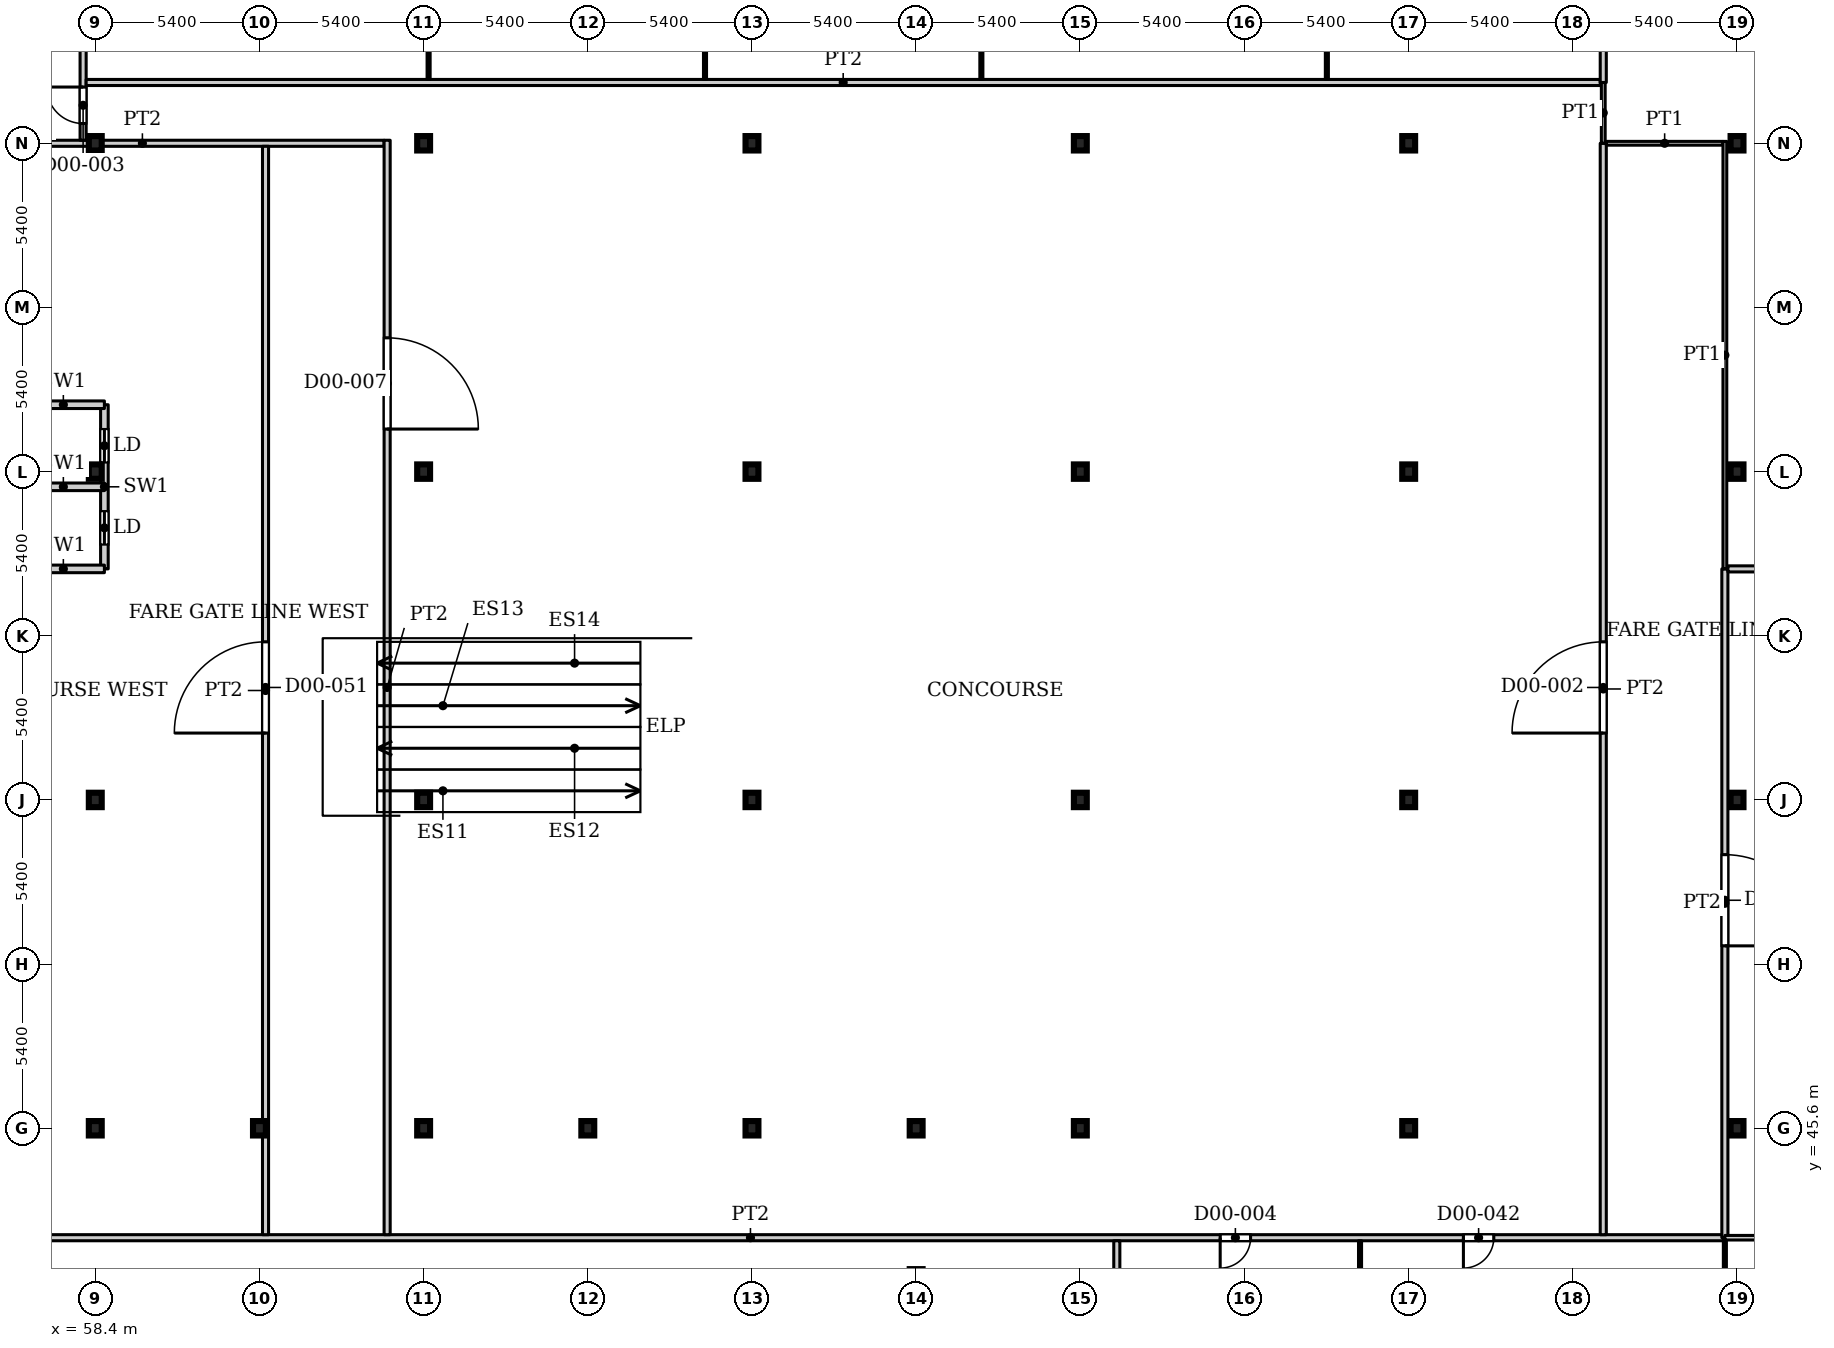
"""IFC4 building model, lengths in metres.
Left out: names, types, materials, properties, quantities, classifications, styles, units other than length and angle.
Written with IfcOpenShell. Run it as: python <this file> out.ifc"""

import sys

from ifc_helpers import new_model, si_unit, direction, frame, frame_2d, origin, origin_2d, place, context, subcontext, project, spatial, rectangle, i_section, extrude, source, transform, mapped, element, fill, save


model = new_model("IFC4")
c1 = context("Model", 3, precision=1e-05, world=origin(), true_north=direction((0.0, 1.0)))
c2 = subcontext(c1, "Body", "Model", "MODEL_VIEW")
j1 = project(units=[si_unit("LENGTHUNIT", "METRE"), si_unit("PLANEANGLEUNIT", "RADIAN")], contexts=[c1])
p1 = place(None, origin())
s1 = spatial("IfcSite", under=j1, at=p1, CompositionType="ELEMENT")
p2 = place(p1, origin())
s2 = spatial("IfcBuilding", under=s1, at=p2, CompositionType="ELEMENT")
p3 = place(p2, origin())
s3 = spatial("IfcBuildingStorey", under=s2, at=p3, CompositionType="ELEMENT", Elevation=0.0)
for number, where, z_axis, x_axis in (
    (1, (58.4, 45.6, 0.0), (0.0, 0.0, 1.0), (1.0, 0.0, 0.0)),
    (2, (69.2, 45.6, 0.0), (0.0, 0.0, 1.0), (1.0, 0.0, 0.0)),
    (3, (80.0, 45.6, 0.0), (0.0, 0.0, 1.0), (1.0, 0.0, 0.0)),
    (4, (90.8, 45.6, 0.0), (0.0, 0.0, 1.0), (1.0, 0.0, 0.0)),
    (5, (101.6, 45.6, 0.0), (0.0, 0.0, 1.0), (1.0, 0.0, 0.0)),
    (6, (112.4, 45.6, 0.0), (0.0, 0.0, 1.0), (1.0, 0.0, 0.0)),
    (7, (58.4, 56.4, 0.0), (0.0, 0.0, 1.0), (1.0, 0.0, 0.0)),
    (8, (69.2, 56.4, 0.0), (0.0, 0.0, 1.0), (1.0, 0.0, 0.0)),
    (9, (80.0, 56.4, 0.0), (0.0, 0.0, 1.0), (1.0, 0.0, 0.0)),
    (10, (90.8, 56.4, 0.0), (0.0, 0.0, 1.0), (1.0, 0.0, 0.0)),
    (11, (101.6, 56.4, 0.0), (0.0, 0.0, 1.0), (1.0, 0.0, 0.0)),
    (12, (112.4, 56.4, 0.0), (0.0, 0.0, 1.0), (1.0, 0.0, 0.0)),
    (13, (58.4, 67.2, 0.0), (0.0, 0.0, 1.0), (1.0, 0.0, 0.0)),
    (14, (69.2, 67.2, 0.0), (0.0, 0.0, 1.0), (1.0, 0.0, 0.0)),
    (15, (80.0, 67.2, 0.0), (0.0, 0.0, 1.0), (1.0, 0.0, 0.0)),
    (16, (90.8, 67.2, 0.0), (0.0, 0.0, 1.0), (1.0, 0.0, 0.0)),
    (17, (101.6, 67.2, 0.0), (0.0, 0.0, 1.0), (1.0, 0.0, 0.0)),
    (18, (112.4, 67.2, 0.0), (0.0, 0.0, 1.0), (1.0, 0.0, 0.0)),
    (19, (58.4, 78.0, 0.0), (0.0, 0.0, 1.0), (1.0, 0.0, 0.0)),
    (20, (69.2, 78.0, 0.0), (0.0, 0.0, 1.0), (1.0, 0.0, 0.0)),
    (21, (80.0, 78.0, 0.0), (0.0, 0.0, 1.0), (1.0, 0.0, 0.0)),
    (22, (90.8, 78.0, 0.0), (0.0, 0.0, 1.0), (1.0, 0.0, 0.0)),
    (23, (101.6, 78.0, 0.0), (0.0, 0.0, 1.0), (1.0, 0.0, 0.0)),
    (24, (112.4, 78.0, 0.0), (0.0, 0.0, 1.0), (1.0, 0.0, 0.0)),
    (25, (63.8, 45.6, 0.0), (0.0, 0.0, 1.0), (1.0, 0.0, 0.0)),
    (26, (74.6, 45.6, 0.0), (0.0, 0.0, 1.0), (1.0, 0.0, 0.0)),
    (27, (85.4, 45.6, 0.0), (0.0, 0.0, 1.0), (1.0, 0.0, 0.0)),
):
    element("IfcColumn", number, at=place(p3, frame(where, z_axis=z_axis, x_axis=x_axis)), inside=s3, PredefinedType="COLUMN", context=c2, shape_type="SweptSolid", body=[
        extrude(i_section(OverallWidth=0.424, OverallDepth=0.474, WebThickness=0.048, FlangeThickness=0.077, FilletRadius=0.014, at=origin_2d()), origin(), (0.0, 0.0, 1.0), 7.5),
    ])
p4 = place(p3, frame((58.7, 64.0, 0.0), z_axis=(0.0, 0.0, 1.0), x_axis=(0.0, 1.0, 0.0)))
e28 = element("IfcWall", 28, at=p4, inside=s3, PredefinedType="PARTITIONING", context=c2, shape_type="SweptSolid", body=[
    extrude(rectangle(XDim=5.4, YDim=0.25, at=frame_2d((2.7, 0.0))), origin(), (0.0, 0.0, 1.0), 7.5),
])
p5 = place(p4, frame((0.8, 0.0, 0.0)))
e29 = element("IfcOpeningElement", 29, at=p5, cuts=e28, PredefinedType="OPENING", context=c2, shape_type="SweptSolid", body=[
    extrude(rectangle(XDim=1.1, YDim=2.2, at=frame_2d((0.55, 1.1))), frame((0.0, 0.135, 0.0), z_axis=(0.0, -1.0, 0.0), x_axis=(1.0, 0.0, 0.0)), (0.0, 0.0, 1.0), 0.27),
])
p6 = place(p4, frame((3.5, 0.0, 0.0)))
e30 = element("IfcOpeningElement", 30, at=p6, cuts=e28, PredefinedType="OPENING", context=c2, shape_type="SweptSolid", body=[
    extrude(rectangle(XDim=1.1, YDim=2.2, at=frame_2d((0.55, 1.1))), frame((0.0, 0.135, 0.0), z_axis=(0.0, -1.0, 0.0), x_axis=(1.0, 0.0, 0.0)), (0.0, 0.0, 1.0), 0.27),
])
for number, where, z_axis, x_axis in (
    (31, (56.0, 64.0, 0.0), (0.0, 0.0, 1.0), (1.0, 0.0, 0.0)),
    (32, (56.0, 66.7, 0.0), (0.0, 0.0, 1.0), (1.0, 0.0, 0.0)),
    (33, (56.0, 69.4, 0.0), (0.0, 0.0, 1.0), (1.0, 0.0, 0.0)),
):
    element("IfcWall", number, at=place(p3, frame(where, z_axis=z_axis, x_axis=x_axis)), inside=s3, PredefinedType="PARTITIONING", context=c2, shape_type="SweptSolid", body=[
        extrude(rectangle(XDim=2.7, YDim=0.25, at=frame_2d((1.35, 0.0))), origin(), (0.0, 0.0, 1.0), 7.5),
    ])
p7 = place(p3, frame((47.9, 42.0, 0.0), z_axis=(0.0, 0.0, 1.0), x_axis=(1.0, 0.0, 0.0)))
e34 = element("IfcWall", 34, at=p7, inside=s3, PredefinedType="PARTITIONING", context=c2, shape_type="SweptSolid", body=[
    extrude(rectangle(XDim=64.1, YDim=0.2, at=frame_2d((32.05, 0.0))), origin(), (0.0, 0.0, 1.0), 7.08),
])
p8 = place(p7, frame((47.5, 0.0, 0.0)))
e35 = element("IfcOpeningElement", 35, at=p8, cuts=e34, PredefinedType="OPENING", context=c2, shape_type="SweptSolid", body=[
    extrude(rectangle(XDim=1.0, YDim=2.1, at=frame_2d((0.5, 1.05))), frame((0.0, 0.11, 0.0), z_axis=(0.0, -1.0, 0.0), x_axis=(1.0, 0.0, 0.0)), (0.0, 0.0, 1.0), 0.22),
])
p9 = place(p7, frame((55.5, 0.0, 0.0)))
e36 = element("IfcOpeningElement", 36, at=p9, cuts=e34, PredefinedType="OPENING", context=c2, shape_type="SweptSolid", body=[
    extrude(rectangle(XDim=1.0, YDim=2.1, at=frame_2d((0.5, 1.05))), frame((0.0, 0.11, 0.0), z_axis=(0.0, -1.0, 0.0), x_axis=(1.0, 0.0, 0.0)), (0.0, 0.0, 1.0), 0.22),
])
p10 = place(p3, frame((52.0, 78.0, 0.0), z_axis=(0.0, 0.0, 1.0), x_axis=(1.0, 0.0, 0.0)))
e37 = element("IfcWall", 37, at=p10, inside=s3, PredefinedType="PARTITIONING", context=c2, shape_type="SweptSolid", body=[
    extrude(rectangle(XDim=15.9, YDim=0.2, at=frame_2d((7.95, 0.0))), origin(), (0.0, 0.0, 1.0), 7.08),
])
p11 = place(p10, frame((1.9, 0.0, 0.0)))
e38 = element("IfcOpeningElement", 38, at=p11, cuts=e37, PredefinedType="OPENING", context=c2, shape_type="SweptSolid", body=[
    extrude(rectangle(XDim=2.4, YDim=2.1, at=frame_2d((1.2, 1.05))), frame((0.0, 0.11, 0.0), z_axis=(0.0, -1.0, 0.0), x_axis=(1.0, 0.0, 0.0)), (0.0, 0.0, 1.0), 0.22),
])
p12 = place(p3, frame((58.0, 78.1, 0.0), z_axis=(0.0, 0.0, 1.0), x_axis=(0.0, 1.0, 0.0)))
e39 = element("IfcWall", 39, at=p12, inside=s3, PredefinedType="PARTITIONING", context=c2, shape_type="SweptSolid", body=[
    extrude(rectangle(XDim=31.9, YDim=0.2, at=frame_2d((15.95, 0.0))), origin(), (0.0, 0.0, 1.0), 7.08),
])
p13 = place(p12, frame((0.55, 0.0, 0.0)))
e40 = element("IfcOpeningElement", 40, at=p13, cuts=e39, PredefinedType="OPENING", context=c2, shape_type="SweptSolid", body=[
    extrude(rectangle(XDim=1.2, YDim=2.1, at=frame_2d((0.6, 1.05))), frame((0.0, 0.11, 0.0), z_axis=(0.0, -1.0, 0.0), x_axis=(1.0, 0.0, 0.0)), (0.0, 0.0, 1.0), 0.22),
])
p14 = place(p3, frame((58.1, 80.0, 0.0), z_axis=(0.0, 0.0, 1.0), x_axis=(1.0, 0.0, 0.0)))
e41 = element("IfcWall", 41, at=p14, inside=s3, PredefinedType="PARTITIONING", context=c2, shape_type="SweptSolid", body=[
    extrude(rectangle(XDim=49.8, YDim=0.2, at=frame_2d((24.9, 0.0))), origin(), (0.0, 0.0, 1.0), 7.08),
])
p15 = place(p3, frame((64.0, 42.1, 0.0), z_axis=(0.0, 0.0, 1.0), x_axis=(0.0, 1.0, 0.0)))
e42 = element("IfcWall", 42, at=p15, inside=s3, PredefinedType="PARTITIONING", context=c2, shape_type="SweptSolid", body=[
    extrude(rectangle(XDim=35.8, YDim=0.2, at=frame_2d((17.9, 0.0))), origin(), (0.0, 0.0, 1.0), 7.08),
])
p16 = place(p15, frame((16.5, 0.0, 0.0)))
e43 = element("IfcOpeningElement", 43, at=p16, cuts=e42, PredefinedType="OPENING", context=c2, shape_type="SweptSolid", body=[
    extrude(rectangle(XDim=3.0, YDim=2.1, at=frame_2d((1.5, 1.05))), frame((0.0, 0.11, 0.0), z_axis=(0.0, -1.0, 0.0), x_axis=(1.0, 0.0, 0.0)), (0.0, 0.0, 1.0), 0.22),
])
p17 = place(p3, frame((68.0, 42.1, 0.0), z_axis=(0.0, 0.0, 1.0), x_axis=(0.0, 1.0, 0.0)))
e44 = element("IfcWall", 44, at=p17, inside=s3, PredefinedType="PARTITIONING", context=c2, shape_type="SweptSolid", body=[
    extrude(rectangle(XDim=36.0, YDim=0.2, at=frame_2d((18.0, 0.0))), origin(), (0.0, 0.0, 1.0), 7.08),
])
p18 = place(p17, frame((26.5, 0.0, 0.0)))
e45 = element("IfcOpeningElement", 45, at=p18, cuts=e44, PredefinedType="OPENING", context=c2, shape_type="SweptSolid", body=[
    extrude(rectangle(XDim=3.0, YDim=2.1, at=frame_2d((1.5, 1.05))), frame((0.0, 0.11, 0.0), z_axis=(0.0, -1.0, 0.0), x_axis=(1.0, 0.0, 0.0)), (0.0, 0.0, 1.0), 0.22),
])
for number, where, z_axis, x_axis in (
    (46, (69.364, 80.1, 0.0), (0.0, 0.0, 1.0), (0.0, 1.0, 0.0)),
    (47, (78.455, 80.1, 0.0), (0.0, 0.0, 1.0), (0.0, 1.0, 0.0)),
    (48, (87.545, 80.1, 0.0), (0.0, 0.0, 1.0), (0.0, 1.0, 0.0)),
):
    element("IfcWall", number, at=place(p3, frame(where, z_axis=z_axis, x_axis=x_axis)), inside=s3, PredefinedType="PARTITIONING", context=c2, shape_type="SweptSolid", body=[
        extrude(rectangle(XDim=8.2, YDim=0.1, at=frame_2d((4.1, 0.0))), origin(), (0.0, 0.0, 1.0), 7.08),
    ])
p19 = place(p3, frame((92.0, 30.0, 0.0), z_axis=(0.0, 0.0, 1.0), x_axis=(0.0, 1.0, 0.0)))
e49 = element("IfcWall", 49, at=p19, inside=s3, PredefinedType="PARTITIONING", context=c2, shape_type="SweptSolid", body=[
    extrude(rectangle(XDim=11.9, YDim=0.2, at=frame_2d((5.95, 0.0))), origin(), (0.0, 0.0, 1.0), 7.08),
])
p20 = place(p3, frame((98.909, 80.1, 0.0), z_axis=(0.0, 0.0, 1.0), x_axis=(0.0, 1.0, 0.0)))
e50 = element("IfcWall", 50, at=p20, inside=s3, PredefinedType="PARTITIONING", context=c2, shape_type="SweptSolid", body=[
    extrude(rectangle(XDim=8.2, YDim=0.1, at=frame_2d((4.1, 0.0))), origin(), (0.0, 0.0, 1.0), 7.08),
])
p21 = place(p3, frame((100.0, 30.125, 0.0), z_axis=(0.0, 0.0, 1.0), x_axis=(0.0, 1.0, 0.0)))
e51 = element("IfcWall", 51, at=p21, inside=s3, PredefinedType="PARTITIONING", context=c2, shape_type="SweptSolid", body=[
    extrude(rectangle(XDim=11.775, YDim=0.1, at=frame_2d((5.887, 0.0))), origin(), (0.0, 0.0, 1.0), 7.08),
])
p22 = place(p3, frame((108.0, 42.1, 0.0), z_axis=(0.0, 0.0, 1.0), x_axis=(0.0, 1.0, 0.0)))
e52 = element("IfcWall", 52, at=p22, inside=s3, PredefinedType="PARTITIONING", context=c2, shape_type="SweptSolid", body=[
    extrude(rectangle(XDim=35.9, YDim=0.2, at=frame_2d((17.95, 0.0))), origin(), (0.0, 0.0, 1.0), 7.08),
])
p23 = place(p22, frame((16.5, 0.0, 0.0)))
e53 = element("IfcOpeningElement", 53, at=p23, cuts=e52, PredefinedType="OPENING", context=c2, shape_type="SweptSolid", body=[
    extrude(rectangle(XDim=3.0, YDim=2.1, at=frame_2d((1.5, 1.05))), frame((0.0, 0.11, 0.0), z_axis=(0.0, -1.0, 0.0), x_axis=(1.0, 0.0, 0.0)), (0.0, 0.0, 1.0), 0.22),
])
p24 = place(p3, frame((108.0, 78.0, 0.0), z_axis=(0.0, 0.0, 1.0), x_axis=(0.0, 1.0, 0.0)))
e54 = element("IfcWall", 54, at=p24, inside=s3, PredefinedType="PARTITIONING", context=c2, shape_type="SweptSolid", body=[
    extrude(rectangle(XDim=2.0, YDim=0.125, at=frame_2d((1.0, 0.0))), origin(), (0.0, 0.0, 1.0), 7.08),
])
p25 = place(p3, frame((108.0, 80.0, 0.0), z_axis=(0.0, 0.0, 1.0), x_axis=(0.0, 1.0, 0.0)))
e55 = element("IfcWall", 55, at=p25, inside=s3, PredefinedType="PARTITIONING", context=c2, shape_type="SweptSolid", body=[
    extrude(rectangle(XDim=8.4, YDim=0.2, at=frame_2d((4.2, 0.0))), origin(), (0.0, 0.0, 1.0), 7.08),
])
p26 = place(p3, frame((108.1, 78.0, 0.0), z_axis=(0.0, 0.0, 1.0), x_axis=(1.0, 0.0, 0.0)))
e56 = element("IfcWall", 56, at=p26, inside=s3, PredefinedType="PARTITIONING", context=c2, shape_type="SweptSolid", body=[
    extrude(rectangle(XDim=3.838, YDim=0.125, at=frame_2d((1.919, 0.0))), origin(), (0.0, 0.0, 1.0), 7.08),
])
p27 = place(p3, frame((112.0, 30.125, 0.0), z_axis=(0.0, 0.0, 1.0), x_axis=(0.0, 1.0, 0.0)))
e57 = element("IfcWall", 57, at=p27, inside=s3, PredefinedType="PARTITIONING", context=c2, shape_type="SweptSolid", body=[
    extrude(rectangle(XDim=11.875, YDim=0.1, at=frame_2d((5.938, 0.0))), origin(), (0.0, 0.0, 1.0), 7.08),
])
p28 = place(p3, frame((112.0, 42.0, 0.0), z_axis=(0.0, 0.0, 1.0), x_axis=(0.0, 1.0, 0.0)))
e58 = element("IfcWall", 58, at=p28, inside=s3, PredefinedType="PARTITIONING", context=c2, shape_type="SweptSolid", body=[
    extrude(rectangle(XDim=22.0, YDim=0.2, at=frame_2d((11.0, 0.0))), origin(), (0.0, 0.0, 1.0), 7.08),
])
p29 = place(p28, frame((9.6, 0.0, 0.0)))
e59 = element("IfcOpeningElement", 59, at=p29, cuts=e58, PredefinedType="OPENING", context=c2, shape_type="SweptSolid", body=[
    extrude(rectangle(XDim=3.0, YDim=2.1, at=frame_2d((1.5, 1.05))), frame((0.0, 0.11, 0.0), z_axis=(0.0, -1.0, 0.0), x_axis=(1.0, 0.0, 0.0)), (0.0, 0.0, 1.0), 0.22),
])
p30 = place(p3, frame((112.0, 42.0, 0.0), z_axis=(0.0, 0.0, 1.0), x_axis=(1.0, 0.0, 0.0)))
e60 = element("IfcWall", 60, at=p30, inside=s3, PredefinedType="PARTITIONING", context=c2, shape_type="SweptSolid", body=[
    extrude(rectangle(XDim=11.925, YDim=0.15, at=frame_2d((5.962, 0.0))), origin(), (0.0, 0.0, 1.0), 7.08),
])
p31 = place(p30, frame((3.4, 0.0, 0.0)))
e61 = element("IfcOpeningElement", 61, at=p31, cuts=e60, PredefinedType="OPENING", context=c2, shape_type="SweptSolid", body=[
    extrude(rectangle(XDim=1.0, YDim=2.1, at=frame_2d((0.5, 1.05))), frame((0.0, 0.085, 0.0), z_axis=(0.0, -1.0, 0.0), x_axis=(1.0, 0.0, 0.0)), (0.0, 0.0, 1.0), 0.17),
])
p32 = place(p30, frame((9.4, 0.0, 0.0)))
e62 = element("IfcOpeningElement", 62, at=p32, cuts=e60, PredefinedType="OPENING", context=c2, shape_type="SweptSolid", body=[
    extrude(rectangle(XDim=1.0, YDim=2.1, at=frame_2d((0.5, 1.05))), frame((0.0, 0.085, 0.0), z_axis=(0.0, -1.0, 0.0), x_axis=(1.0, 0.0, 0.0)), (0.0, 0.0, 1.0), 0.17),
])
p33 = place(p3, frame((112.0, 64.0, 0.0), z_axis=(0.0, 0.0, 1.0), x_axis=(0.0, 1.0, 0.0)))
e63 = element("IfcWall", 63, at=p33, inside=s3, PredefinedType="PARTITIONING", context=c2, shape_type="SweptSolid", body=[
    extrude(rectangle(XDim=14.062, YDim=0.125, at=frame_2d((7.031, 0.0))), origin(), (0.0, 0.0, 1.0), 7.08),
])
p34 = place(p3, frame((112.1, 64.0, 0.0), z_axis=(0.0, 0.0, 1.0), x_axis=(1.0, 0.0, 0.0)))
e64 = element("IfcWall", 64, at=p34, inside=s3, PredefinedType="PARTITIONING", context=c2, shape_type="SweptSolid", body=[
    extrude(rectangle(XDim=11.9, YDim=0.2, at=frame_2d((5.95, 0.0))), origin(), (0.0, 0.0, 1.0), 7.08),
])
m1 = source(origin(), c2, "Body", "SweptSolid", [
    extrude(rectangle(XDim=1.1, YDim=2.2, at=frame_2d((0.55, 1.1))), frame((0.0, 0.025, 0.0), z_axis=(0.0, -1.0, 0.0), x_axis=(1.0, 0.0, 0.0)), (0.0, 0.0, 1.0), 0.05),
])
p35 = place(p5, origin())
e65 = element("IfcDoor", 65, at=p35, inside=s3, OperationType="SLIDING_TO_LEFT", PredefinedType="DOOR", context=c2, shape_type="MappedRepresentation", body=[
    mapped(m1, transform((0.0, 0.0, 0.0), x_axis=(1.0, 0.0, 0.0), y_axis=(0.0, 1.0, 0.0), z_axis=(0.0, 0.0, 1.0), scale=1.0)),
])
fill(e29, e65)
p36 = place(p6, origin())
e66 = element("IfcDoor", 66, at=p36, inside=s3, OperationType="SLIDING_TO_LEFT", PredefinedType="DOOR", context=c2, shape_type="MappedRepresentation", body=[
    mapped(m1, transform((0.0, 0.0, 0.0), x_axis=(1.0, 0.0, 0.0), y_axis=(0.0, 1.0, 0.0), z_axis=(0.0, 0.0, 1.0), scale=1.0)),
])
fill(e30, e66)
m2 = source(origin(), c2, "Body", "SweptSolid", [
    extrude(rectangle(XDim=3.0, YDim=2.1, at=frame_2d((1.5, 1.05))), frame((0.0, 0.025, 0.0), z_axis=(0.0, -1.0, 0.0), x_axis=(1.0, 0.0, 0.0)), (0.0, 0.0, 1.0), 0.05),
])
p37 = place(p23, origin())
e67 = element("IfcDoor", 67, at=p37, inside=s3, OperationType="DOUBLE_DOOR_SINGLE_SWING", PredefinedType="DOOR", context=c2, shape_type="MappedRepresentation", body=[
    mapped(m2, transform((0.0, 0.0, 0.0), x_axis=(1.0, 0.0, 0.0), y_axis=(0.0, 1.0, 0.0), z_axis=(0.0, 0.0, 1.0), scale=1.0)),
])
fill(e53, e67)
m3 = source(origin(), c2, "Body", "SweptSolid", [
    extrude(rectangle(XDim=1.2, YDim=2.1, at=frame_2d((0.6, 1.05))), frame((0.0, 0.025, 0.0), z_axis=(0.0, -1.0, 0.0), x_axis=(1.0, 0.0, 0.0)), (0.0, 0.0, 1.0), 0.05),
])
p38 = place(p13, origin())
e68 = element("IfcDoor", 68, at=p38, inside=s3, OperationType="SINGLE_SWING_LEFT", PredefinedType="DOOR", context=c2, shape_type="MappedRepresentation", body=[
    mapped(m3, transform((0.0, 0.0, 0.0), x_axis=(1.0, 0.0, 0.0), y_axis=(0.0, 1.0, 0.0), z_axis=(0.0, 0.0, 1.0), scale=1.0)),
])
fill(e40, e68)
m4 = source(origin(), c2, "Body", "SweptSolid", [
    extrude(rectangle(XDim=1.0, YDim=2.1, at=frame_2d((0.5, 1.05))), frame((0.0, 0.025, 0.0), z_axis=(0.0, -1.0, 0.0), x_axis=(1.0, 0.0, 0.0)), (0.0, 0.0, 1.0), 0.05),
])
p39 = place(p8, origin())
e69 = element("IfcDoor", 69, at=p39, inside=s3, OperationType="SINGLE_SWING_RIGHT", PredefinedType="DOOR", context=c2, shape_type="MappedRepresentation", body=[
    mapped(m4, transform((0.0, 0.0, 0.0), x_axis=(1.0, 0.0, 0.0), y_axis=(0.0, 1.0, 0.0), z_axis=(0.0, 0.0, 1.0), scale=1.0)),
])
fill(e35, e69)
p40 = place(p29, origin())
e70 = element("IfcDoor", 70, at=p40, inside=s3, OperationType="DOUBLE_DOOR_SINGLE_SWING", PredefinedType="DOOR", context=c2, shape_type="MappedRepresentation", body=[
    mapped(m2, transform((0.0, 0.0, 0.0), x_axis=(1.0, 0.0, 0.0), y_axis=(0.0, 1.0, 0.0), z_axis=(0.0, 0.0, 1.0), scale=1.0)),
])
fill(e59, e70)
p41 = place(p18, origin())
e71 = element("IfcDoor", 71, at=p41, inside=s3, OperationType="DOUBLE_DOOR_SINGLE_SWING", PredefinedType="DOOR", context=c2, shape_type="MappedRepresentation", body=[
    mapped(m2, transform((0.0, 0.0, 0.0), x_axis=(1.0, 0.0, 0.0), y_axis=(0.0, 1.0, 0.0), z_axis=(0.0, 0.0, 1.0), scale=1.0)),
])
fill(e45, e71)
p42 = place(p9, origin())
e72 = element("IfcDoor", 72, at=p42, inside=s3, OperationType="SINGLE_SWING_RIGHT", PredefinedType="DOOR", context=c2, shape_type="MappedRepresentation", body=[
    mapped(m4, transform((0.0, 0.0, 0.0), x_axis=(1.0, 0.0, 0.0), y_axis=(0.0, 1.0, 0.0), z_axis=(0.0, 0.0, 1.0), scale=1.0)),
])
fill(e36, e72)
p43 = place(p16, origin())
e73 = element("IfcDoor", 73, at=p43, inside=s3, OperationType="DOUBLE_DOOR_SINGLE_SWING", PredefinedType="DOOR", context=c2, shape_type="MappedRepresentation", body=[
    mapped(m2, transform((0.0, 0.0, 0.0), x_axis=(1.0, 0.0, 0.0), y_axis=(0.0, 1.0, 0.0), z_axis=(0.0, 0.0, 1.0), scale=1.0)),
])
fill(e43, e73)
save(model, sys.argv[1])
